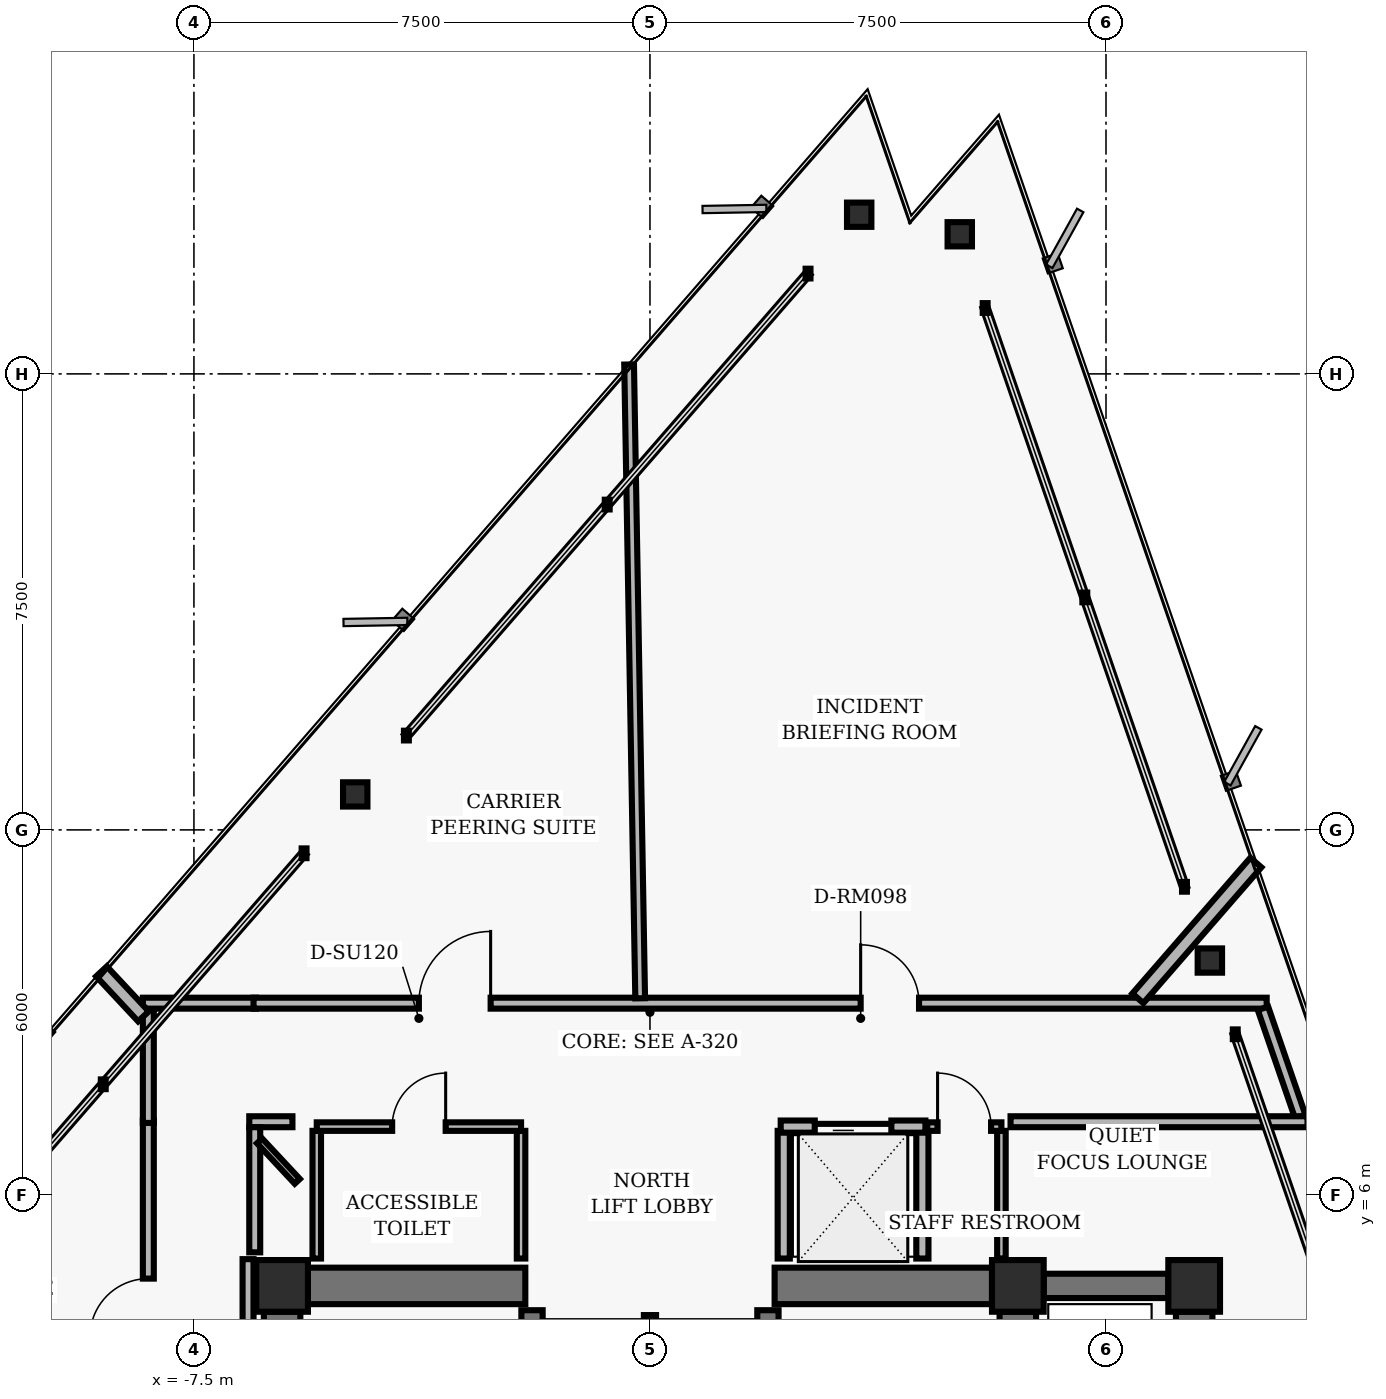
"""IFC4 building model, lengths in metres.
Left out: names, types, materials, properties, quantities, classifications, styles, units other than length and angle.
Written with IfcOpenShell. Run it as: python <this file> out.ifc"""

import sys

from ifc_helpers import new_model, si_unit, direction, frame, frame_2d, origin, origin_2d, place, context, subcontext, project, spatial, rectangle, hollow_rectangle, i_section, extrude, element, fill, save


model = new_model("IFC4")
c1 = context("Model", 3, precision=1e-05, world=origin(), true_north=direction((0.0, 1.0)))
c2 = subcontext(c1, "Body", "Model", "MODEL_VIEW")
j1 = project(units=[si_unit("LENGTHUNIT", "METRE"), si_unit("PLANEANGLEUNIT", "RADIAN")], contexts=[c1])
p1 = place(None, origin())
s1 = spatial("IfcSite", under=j1, at=p1, CompositionType="ELEMENT")
p2 = place(p1, origin())
s2 = spatial("IfcBuilding", under=s1, at=p2, CompositionType="ELEMENT")
p3 = place(p2, frame((0.0, 0.0, 156.32)))
s3 = spatial("IfcBuildingStorey", under=s2, at=p3, CompositionType="ELEMENT", Elevation=156.32)
for number, where, z_axis, x_axis in (
    (1, (-6.05, 4.5, 0.0), (0.0, 0.0, 1.0), (1.0, 0.0, 0.0)),
    (2, (6.05, 4.5, 0.0), (0.0, 0.0, 1.0), (1.0, 0.0, 0.0)),
    (3, (8.95, 4.5, 0.0), (0.0, 0.0, 1.0), (1.0, 0.0, 0.0)),
):
    element("IfcColumn", number, at=place(p3, frame(where, z_axis=z_axis, x_axis=x_axis)), inside=s3, PredefinedType="COLUMN", context=c2, shape_type="SweptSolid", body=[
        extrude(hollow_rectangle(XDim=0.85, YDim=0.85, WallThickness=0.055, InnerFilletRadius=0.02, OuterFilletRadius=0.04, at=origin_2d()), origin(), (0.0, 0.0, 1.0), 3.04),
    ])
for number, where, z_axis, x_axis in (
    (4, (-6.05, 0.425, 0.0), (0.0, 0.0, 1.0), (0.0, 1.0, 0.0)),
    (5, (6.05, 0.425, 0.0), (0.0, 0.0, 1.0), (0.0, 1.0, 0.0)),
):
    element("IfcWall", number, at=place(p3, frame(where, z_axis=z_axis, x_axis=x_axis)), inside=s3, PredefinedType="SHEAR", context=c2, shape_type="SweptSolid", body=[
        extrude(rectangle(XDim=3.65, YDim=0.6, at=frame_2d((1.825, 0.0))), origin(), (0.0, 0.0, 1.0), 2.788),
    ])
for number, where, z_axis, x_axis in (
    (6, (-1.94, -4.1, 0.0), (0.0, 0.0, 1.0), (0.0, 1.0, 0.0)),
    (7, (1.94, -4.1, 0.0), (0.0, 0.0, 1.0), (0.0, 1.0, 0.0)),
):
    element("IfcWall", number, at=place(p3, frame(where, z_axis=z_axis, x_axis=x_axis)), inside=s3, PredefinedType="SHEAR", context=c2, shape_type="SweptSolid", body=[
        extrude(rectangle(XDim=8.2, YDim=0.35, at=frame_2d((4.1, 0.0))), origin(), (0.0, 0.0, 1.0), 2.788),
    ])
for number, where, z_axis, x_axis in (
    (8, (-5.625, 4.5, 0.0), (0.0, 0.0, 1.0), (1.0, 0.0, 0.0)),
    (9, (2.05, 4.5, 0.0), (0.0, 0.0, 1.0), (1.0, 0.0, 0.0)),
):
    element("IfcWall", number, at=place(p3, frame(where, z_axis=z_axis, x_axis=x_axis)), inside=s3, PredefinedType="SHEAR", context=c2, shape_type="SweptSolid", body=[
        extrude(rectangle(XDim=3.575, YDim=0.6, at=frame_2d((1.788, 0.0))), origin(), (0.0, 0.0, 1.0), 2.788),
    ])
p4 = place(p3, frame((8.95, -3.875, 0.0), z_axis=(0.0, 0.0, 1.0), x_axis=(0.0, 1.0, 0.0)))
e10 = element("IfcWall", 10, at=p4, inside=s3, PredefinedType="SHEAR", context=c2, shape_type="SweptSolid", body=[
    extrude(rectangle(XDim=7.95, YDim=0.6, at=frame_2d((3.975, 0.0))), origin(), (0.0, 0.0, 1.0), 2.788),
])
p5 = place(p4, frame((0.55, 0.0, 0.0)))
e11 = element("IfcOpeningElement", 11, at=p5, cuts=e10, PredefinedType="OPENING", context=c2, shape_type="SweptSolid", body=[
    extrude(rectangle(XDim=1.06, YDim=2.04, at=frame_2d((0.53, 1.02))), frame((0.0, 0.31, 0.0), z_axis=(0.0, -1.0, 0.0), x_axis=(1.0, 0.0, 0.0)), (0.0, 0.0, 1.0), 0.62),
])
p6 = place(p4, frame((3.445, 0.0, 0.0)))
e12 = element("IfcOpeningElement", 12, at=p6, cuts=e10, PredefinedType="OPENING", context=c2, shape_type="SweptSolid", body=[
    extrude(rectangle(XDim=1.06, YDim=2.04, at=frame_2d((0.53, 1.02))), frame((0.0, 0.31, 0.0), z_axis=(0.0, -1.0, 0.0), x_axis=(1.0, 0.0, 0.0)), (0.0, 0.0, 1.0), 0.62),
])
p7 = place(p4, frame((6.33, 0.0, 0.0)))
e13 = element("IfcOpeningElement", 13, at=p7, cuts=e10, PredefinedType="OPENING", context=c2, shape_type="SweptSolid", body=[
    extrude(rectangle(XDim=1.06, YDim=2.04, at=frame_2d((0.53, 1.02))), frame((0.0, 0.31, 0.0), z_axis=(0.0, -1.0, 0.0), x_axis=(1.0, 0.0, 0.0)), (0.0, 0.0, 1.0), 0.62),
])
p8 = place(p3, frame((6.475, 4.5, 0.0), z_axis=(0.0, 0.0, 1.0), x_axis=(1.0, 0.0, 0.0)))
e14 = element("IfcWall", 14, at=p8, inside=s3, PredefinedType="SHEAR", context=c2, shape_type="SweptSolid", body=[
    extrude(rectangle(XDim=2.05, YDim=0.4, at=frame_2d((1.025, 0.0))), origin(), (0.0, 0.0, 1.0), 2.788),
])
for number, where, z_axis, x_axis in (
    (15, (9.208, 9.851, 0.0), (0.0, 0.0, 1.0), (1.0, 0.0, 0.0)),
    (16, (5.095, 21.796, 0.0), (0.0, 0.0, 1.0), (1.0, 0.0, 0.0)),
    (17, (3.441, 22.118, 0.0), (0.0, 0.0, 1.0), (1.0, 0.0, 0.0)),
    (18, (-4.847, 12.583, 0.0), (0.0, 0.0, 1.0), (1.0, 0.0, 0.0)),
):
    element("IfcColumn", number, at=place(p3, frame(where, z_axis=z_axis, x_axis=x_axis)), inside=s3, PredefinedType="COLUMN", context=c2, shape_type="SweptSolid", body=[
        extrude(i_section(OverallWidth=0.401, OverallDepth=0.399, WebThickness=0.025, FlangeThickness=0.04, FilletRadius=0.018, at=origin_2d()), origin(), (0.0, 0.0, 1.0), 3.04),
    ])
p9 = place(p3, frame((0.0, 1.25, 0.0), z_axis=(0.0, 0.0, 1.0), x_axis=(0.0, 1.0, 0.0)))
e19 = element("IfcWall", 19, at=p9, inside=s3, PredefinedType="PARTITIONING", context=c2, shape_type="SweptSolid", body=[
    extrude(rectangle(XDim=2.77, YDim=0.2, at=frame_2d((1.385, 0.0))), origin(), (0.0, 0.0, 1.0), 2.763),
])
for number, where, z_axis, x_axis in (
    (20, (2.2, 4.95, 0.0), (0.0, 0.0, 1.0), (0.0, 1.0, 0.0)),
    (21, (4.48, 4.95, 0.0), (0.0, 0.0, 1.0), (0.0, 1.0, 0.0)),
):
    element("IfcWall", number, at=place(p3, frame(where, z_axis=z_axis, x_axis=x_axis)), inside=s3, PredefinedType="PARTITIONING", context=c2, shape_type="SweptSolid", body=[
        extrude(rectangle(XDim=2.1, YDim=0.2, at=frame_2d((1.05, 0.0))), origin(), (0.0, 0.0, 1.0), 2.763),
    ])
p10 = place(p3, frame((2.15, 7.12, 0.0), z_axis=(0.0, 0.0, 1.0), x_axis=(1.0, 0.0, 0.0)))
e22 = element("IfcWall", 22, at=p10, inside=s3, PredefinedType="PARTITIONING", context=c2, shape_type="SweptSolid", body=[
    extrude(rectangle(XDim=2.38, YDim=0.2, at=frame_2d((1.19, 0.0))), origin(), (0.0, 0.0, 1.0), 2.763),
])
p11 = place(p10, frame((0.56, 0.0, 0.0)))
e23 = element("IfcOpeningElement", 23, at=p11, cuts=e22, PredefinedType="OPENING", context=c2, shape_type="SweptSolid", body=[
    extrude(rectangle(XDim=1.26, YDim=2.06, at=frame_2d((0.63, 1.03))), frame((0.0, 0.11, 0.0), z_axis=(0.0, -1.0, 0.0), x_axis=(1.0, 0.0, 0.0)), (0.0, 0.0, 1.0), 0.22),
])
for number, where, z_axis, x_axis in (
    (24, (-5.48, 4.95, 0.0), (0.0, 0.0, 1.0), (0.0, 1.0, 0.0)),
    (25, (-2.12, 4.95, 0.0), (0.0, 0.0, 1.0), (0.0, 1.0, 0.0)),
):
    element("IfcWall", number, at=place(p3, frame(where, z_axis=z_axis, x_axis=x_axis)), inside=s3, PredefinedType="PARTITIONING", context=c2, shape_type="SweptSolid", body=[
        extrude(rectangle(XDim=2.1, YDim=0.14, at=frame_2d((1.05, 0.0))), origin(), (0.0, 0.0, 1.0), 2.763),
    ])
p12 = place(p3, frame((-5.48, 7.12, 0.0), z_axis=(0.0, 0.0, 1.0), x_axis=(1.0, 0.0, 0.0)))
e26 = element("IfcWall", 26, at=p12, inside=s3, PredefinedType="PARTITIONING", context=c2, shape_type="SweptSolid", body=[
    extrude(rectangle(XDim=3.36, YDim=0.14, at=frame_2d((1.68, 0.0))), origin(), (0.0, 0.0, 1.0), 2.763),
])
p13 = place(p12, frame((1.24, 0.0, 0.0)))
e27 = element("IfcOpeningElement", 27, at=p13, cuts=e26, PredefinedType="OPENING", context=c2, shape_type="SweptSolid", body=[
    extrude(rectangle(XDim=0.88, YDim=2.02, at=frame_2d((0.44, 1.01))), frame((0.0, 0.08, 0.0), z_axis=(0.0, -1.0, 0.0), x_axis=(1.0, 0.0, 0.0)), (0.0, 0.0, 1.0), 0.16),
])
p14 = place(p3, frame((5.78, 4.95, 0.0), z_axis=(0.0, 0.0, 1.0), x_axis=(0.0, 1.0, 0.0)))
e28 = element("IfcWall", 28, at=p14, inside=s3, PredefinedType="PARTITIONING", context=c2, shape_type="SweptSolid", body=[
    extrude(rectangle(XDim=2.1, YDim=0.14, at=frame_2d((1.05, 0.0))), origin(), (0.0, 0.0, 1.0), 2.763),
])
p15 = place(p3, frame((4.56, 7.12, 0.0), z_axis=(0.0, 0.0, 1.0), x_axis=(1.0, 0.0, 0.0)))
e29 = element("IfcWall", 29, at=p15, inside=s3, PredefinedType="PARTITIONING", context=c2, shape_type="SweptSolid", body=[
    extrude(rectangle(XDim=1.22, YDim=0.14, at=frame_2d((0.61, 0.0))), origin(), (0.0, 0.0, 1.0), 2.763),
])
p16 = place(p15, frame((0.17, 0.0, 0.0)))
e30 = element("IfcOpeningElement", 30, at=p16, cuts=e29, PredefinedType="OPENING", context=c2, shape_type="SweptSolid", body=[
    extrude(rectangle(XDim=0.88, YDim=2.02, at=frame_2d((0.44, 1.01))), frame((0.0, 0.08, 0.0), z_axis=(0.0, -1.0, 0.0), x_axis=(1.0, 0.0, 0.0)), (0.0, 0.0, 1.0), 0.16),
])
p17 = place(p3, frame((-8.25, -7.22, 0.0), z_axis=(0.0, 0.0, 1.0), x_axis=(0.0, 1.0, 0.0)))
e31 = element("IfcWall", 31, at=p17, inside=s3, PredefinedType="PARTITIONING", context=c2, shape_type="SweptSolid", body=[
    extrude(rectangle(XDim=14.44, YDim=0.18, at=frame_2d((7.22, 0.0))), origin(), (0.0, 0.0, 1.0), 2.763),
])
p18 = place(p17, frame((5.457, 0.0, 0.0)))
e32 = element("IfcOpeningElement", 32, at=p18, cuts=e31, PredefinedType="OPENING", context=c2, shape_type="SweptSolid", body=[
    extrude(rectangle(XDim=0.96, YDim=2.02, at=frame_2d((0.48, 1.01))), frame((0.0, 0.1, 0.0), z_axis=(0.0, -1.0, 0.0), x_axis=(1.0, 0.0, 0.0)), (0.0, 0.0, 1.0), 0.2),
])
p19 = place(p17, frame((1.314, 0.0, 0.0)))
e33 = element("IfcOpeningElement", 33, at=p19, cuts=e31, PredefinedType="OPENING", context=c2, shape_type="SweptSolid", body=[
    extrude(rectangle(XDim=0.96, YDim=2.02, at=frame_2d((0.48, 1.01))), frame((0.0, 0.1, 0.0), z_axis=(0.0, -1.0, 0.0), x_axis=(1.0, 0.0, 0.0)), (0.0, 0.0, 1.0), 0.2),
])
p20 = place(p17, frame((10.88, 0.0, 0.0)))
e34 = element("IfcOpeningElement", 34, at=p20, cuts=e31, PredefinedType="OPENING", context=c2, shape_type="SweptSolid", body=[
    extrude(rectangle(XDim=0.96, YDim=2.02, at=frame_2d((0.48, 1.01))), frame((0.0, 0.1, 0.0), z_axis=(0.0, -1.0, 0.0), x_axis=(1.0, 0.0, 0.0)), (0.0, 0.0, 1.0), 0.2),
])
p21 = place(p3, frame((-8.25, 7.18, 0.0), z_axis=(0.0, 0.0, 1.0), x_axis=(0.0, 1.0, 0.0)))
e35 = element("IfcWall", 35, at=p21, inside=s3, PredefinedType="PARTITIONING", context=c2, shape_type="SweptSolid", body=[
    extrude(rectangle(XDim=1.88, YDim=0.18, at=frame_2d((0.94, 0.0))), origin(), (0.0, 0.0, 1.0), 2.763),
])
p22 = place(p3, frame((-8.34, 9.15, 0.0), z_axis=(0.0, 0.0, 1.0), x_axis=(1.0, 0.0, 0.0)))
e36 = element("IfcWall", 36, at=p22, inside=s3, PredefinedType="PARTITIONING", context=c2, shape_type="SweptSolid", body=[
    extrude(rectangle(XDim=1.86, YDim=0.18, at=frame_2d((0.93, 0.0))), origin(), (0.0, 0.0, 1.0), 2.763),
])
p23 = place(p3, frame((-6.52, 9.15, 0.0), z_axis=(0.0, 0.0, 1.0), x_axis=(1.0, 0.0, 0.0)))
e37 = element("IfcWall", 37, at=p23, inside=s3, PredefinedType="PARTITIONING", context=c2, shape_type="SweptSolid", body=[
    extrude(rectangle(XDim=16.662, YDim=0.18, at=frame_2d((8.331, 0.0))), origin(), (0.0, 0.0, 1.0), 2.763),
])
p24 = place(p23, frame((9.985, 0.0, 0.0)))
e38 = element("IfcOpeningElement", 38, at=p24, cuts=e37, PredefinedType="OPENING", context=c2, shape_type="SweptSolid", body=[
    extrude(rectangle(XDim=0.96, YDim=2.02, at=frame_2d((0.48, 1.01))), frame((0.0, 0.1, 0.0), z_axis=(0.0, -1.0, 0.0), x_axis=(1.0, 0.0, 0.0)), (0.0, 0.0, 1.0), 0.2),
])
p25 = place(p23, frame((2.719, 0.0, 0.0)))
e39 = element("IfcOpeningElement", 39, at=p25, cuts=e37, PredefinedType="OPENING", context=c2, shape_type="SweptSolid", body=[
    extrude(rectangle(XDim=1.18, YDim=2.02, at=frame_2d((0.59, 1.01))), frame((0.0, 0.1, 0.0), z_axis=(0.0, -1.0, 0.0), x_axis=(1.0, 0.0, 0.0)), (0.0, 0.0, 1.0), 0.2),
])
p26 = place(p3, frame((10.082, 9.065, 0.0), z_axis=(0.0, 0.0, 1.0), x_axis=(0.325550958337, -0.945524496524, 0.0)))
e40 = element("IfcWall", 40, at=p26, inside=s3, PredefinedType="PARTITIONING", context=c2, shape_type="SweptSolid", body=[
    extrude(rectangle(XDim=1.882, YDim=0.18, at=frame_2d((0.941, 0.0))), origin(), (0.0, 0.0, 1.0), 2.763),
])
p27 = place(p3, frame((10.814, 7.2, 0.0), z_axis=(0.0, 0.0, 1.0), x_axis=(-1.0, 0.0, 0.0)))
e41 = element("IfcWall", 41, at=p27, inside=s3, PredefinedType="PARTITIONING", context=c2, shape_type="SweptSolid", body=[
    extrude(rectangle(XDim=4.884, YDim=0.18, at=frame_2d((2.442, 0.0))), origin(), (0.0, 0.0, 1.0), 2.763),
])
p28 = place(p3, frame((-5.88, 7.2, 0.0), z_axis=(0.0, 0.0, 1.0), x_axis=(-1.0, 0.0, 0.0)))
e42 = element("IfcWall", 42, at=p28, inside=s3, PredefinedType="PARTITIONING", context=c2, shape_type="SweptSolid", body=[
    extrude(rectangle(XDim=0.71, YDim=0.18, at=frame_2d((0.355, 0.0))), origin(), (0.0, 0.0, 1.0), 2.763),
])
p29 = place(p3, frame((-6.5, 7.11, 0.0), z_axis=(0.0, 0.0, 1.0), x_axis=(0.0, -1.0, 0.0)))
e43 = element("IfcWall", 43, at=p29, inside=s3, PredefinedType="PARTITIONING", context=c2, shape_type="SweptSolid", body=[
    extrude(rectangle(XDim=2.058, YDim=0.18, at=frame_2d((1.029, 0.0))), origin(), (0.0, 0.0, 1.0), 2.763),
])
p30 = place(p3, frame((-6.61, 4.94, 0.0), z_axis=(0.0, 0.0, 1.0), x_axis=(0.0, -1.0, 0.0)))
e44 = element("IfcWall", 44, at=p30, inside=s3, PredefinedType="PARTITIONING", context=c2, shape_type="SweptSolid", body=[
    extrude(rectangle(XDim=9.46, YDim=0.18, at=frame_2d((4.73, 0.0))), origin(), (0.0, 0.0, 1.0), 2.763),
])
p31 = place(p3, frame((8.023, 9.23, 0.0), z_axis=(0.0, 0.0, 1.0), x_axis=(0.656082692906, 0.754689008844, 0.0)))
e45 = element("IfcWall", 45, at=p31, inside=s3, PredefinedType="PARTITIONING", context=c2, shape_type="SweptSolid", body=[
    extrude(rectangle(XDim=2.959, YDim=0.24, at=frame_2d((1.479, 0.0))), origin(), (0.0, 0.0, 1.0), 2.763),
])
p32 = place(p3, frame((-0.161, 9.23, 0.0), z_axis=(0.0, 0.0, 1.0), x_axis=(-0.017444651843, 0.999847830483, 0.0)))
e46 = element("IfcWall", 46, at=p32, inside=s3, PredefinedType="PARTITIONING", context=c2, shape_type="SweptSolid", body=[
    extrude(rectangle(XDim=10.426, YDim=0.16, at=frame_2d((5.213, 0.0))), origin(), (0.0, 0.0, 1.0), 2.763),
])
p33 = place(p3, frame((-5.8, 6.22, 0.0), z_axis=(0.0, 0.0, 1.0), x_axis=(-0.681964083565, 0.731385663469, 0.0)))
e47 = element("IfcWall", 47, at=p33, inside=s3, PredefinedType="MOVABLE", context=c2, shape_type="SweptSolid", body=[
    extrude(rectangle(XDim=0.909, YDim=0.115, at=frame_2d((0.455, 0.0))), origin(), (0.0, 0.0, 1.0), 2.763),
])
p34 = place(p3, frame((-8.33, 8.933, 0.0), z_axis=(0.0, 0.0, 1.0), x_axis=(-0.68206891796, 0.731287898952, 0.0)))
e48 = element("IfcWall", 48, at=p34, inside=s3, PredefinedType="PARTITIONING", context=c2, shape_type="SweptSolid", body=[
    extrude(rectangle(XDim=1.012, YDim=0.24, at=frame_2d((0.506, 0.0))), origin(), (0.0, 0.0, 1.0), 2.763),
])
p35 = place(p11, origin())
e49 = element("IfcDoor", 49, at=p35, inside=s3, OperationType="SLIDING_TO_LEFT", PredefinedType="DOOR", context=c2, shape_type="SweptSolid", body=[
    extrude(rectangle(XDim=1.26, YDim=2.06, at=frame_2d((0.63, 1.03))), frame((0.0, 0.025, 0.0), z_axis=(0.0, -1.0, 0.0), x_axis=(1.0, 0.0, 0.0)), (0.0, 0.0, 1.0), 0.05),
])
fill(e23, e49)
p36 = place(p13, origin())
e50 = element("IfcDoor", 50, at=p36, inside=s3, OperationType="SINGLE_SWING_RIGHT", PredefinedType="DOOR", context=c2, shape_type="SweptSolid", body=[
    extrude(rectangle(XDim=0.88, YDim=2.02, at=frame_2d((0.44, 1.01))), frame((0.0, 0.025, 0.0), z_axis=(0.0, -1.0, 0.0), x_axis=(1.0, 0.0, 0.0)), (0.0, 0.0, 1.0), 0.05),
])
fill(e27, e50)
p37 = place(p16, origin())
e51 = element("IfcDoor", 51, at=p37, inside=s3, OperationType="SINGLE_SWING_LEFT", PredefinedType="DOOR", context=c2, shape_type="SweptSolid", body=[
    extrude(rectangle(XDim=0.88, YDim=2.02, at=frame_2d((0.44, 1.01))), frame((0.0, 0.025, 0.0), z_axis=(0.0, -1.0, 0.0), x_axis=(1.0, 0.0, 0.0)), (0.0, 0.0, 1.0), 0.05),
])
fill(e30, e51)
p38 = place(p24, origin())
e52 = element("IfcDoor", 52, at=p38, inside=s3, OperationType="SINGLE_SWING_LEFT", PredefinedType="DOOR", context=c2, shape_type="SweptSolid", body=[
    extrude(rectangle(XDim=0.96, YDim=2.02, at=frame_2d((0.48, 1.01))), frame((0.0, 0.025, 0.0), z_axis=(0.0, -1.0, 0.0), x_axis=(1.0, 0.0, 0.0)), (0.0, 0.0, 1.0), 0.05),
])
fill(e38, e52)
p39 = place(p25, origin())
e53 = element("IfcDoor", 53, at=p39, inside=s3, OperationType="SINGLE_SWING_RIGHT", PredefinedType="DOOR", context=c2, shape_type="SweptSolid", body=[
    extrude(rectangle(XDim=1.18, YDim=2.02, at=frame_2d((0.59, 1.01))), frame((0.0, 0.025, 0.0), z_axis=(0.0, -1.0, 0.0), x_axis=(1.0, 0.0, 0.0)), (0.0, 0.0, 1.0), 0.05),
])
fill(e39, e53)
p40 = place(p20, origin())
e54 = element("IfcDoor", 54, at=p40, inside=s3, OperationType="SINGLE_SWING_LEFT", PredefinedType="DOOR", context=c2, shape_type="SweptSolid", body=[
    extrude(rectangle(XDim=0.96, YDim=2.02, at=frame_2d((0.48, 1.01))), frame((0.0, 0.025, 0.0), z_axis=(0.0, -1.0, 0.0), x_axis=(1.0, 0.0, 0.0)), (0.0, 0.0, 1.0), 0.05),
])
fill(e34, e54)
save(model, sys.argv[1])
